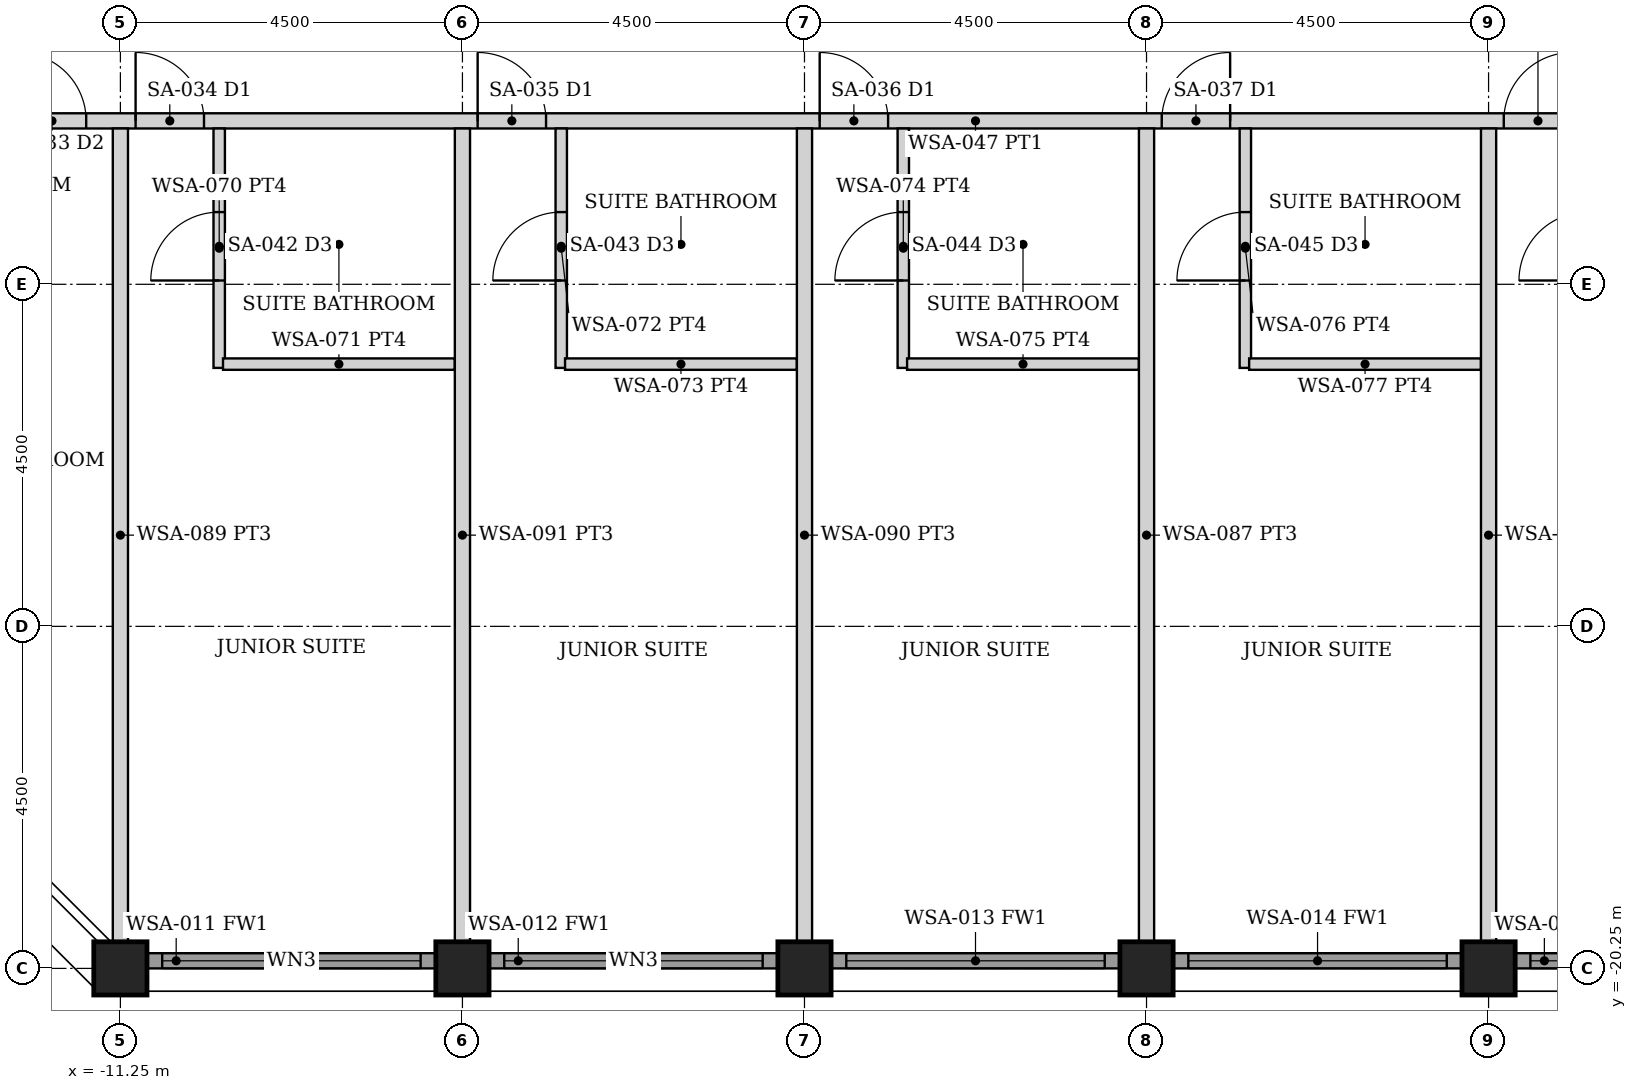
"""IFC4 building model, lengths in metres.
Left out: names, types, materials, properties, quantities, classifications, styles, units other than length and angle.
Written with IfcOpenShell. Run it as: python <this file> out.ifc"""

import sys

from ifc_helpers import new_model, si_unit, direction, frame, frame_2d, origin, origin_2d, place, context, subcontext, project, spatial, rectangle, hollow_rectangle, extrude, element, fill, save


model = new_model("IFC4")
c1 = context("Model", 3, precision=1e-05, world=origin(), true_north=direction((0.0, 1.0)))
c2 = subcontext(c1, "Body", "Model", "MODEL_VIEW")
j1 = project(units=[si_unit("LENGTHUNIT", "METRE"), si_unit("PLANEANGLEUNIT", "RADIAN")], contexts=[c1])
p1 = place(None, origin())
s1 = spatial("IfcSite", under=j1, at=p1, CompositionType="ELEMENT")
p2 = place(p1, origin())
s2 = spatial("IfcBuilding", under=s1, at=p2, CompositionType="ELEMENT")
p3 = place(p2, frame((0.0, 0.0, 200.8)))
s3 = spatial("IfcBuildingStorey", under=s2, at=p3, CompositionType="ELEMENT", Elevation=200.8)
for number, where, z_axis, x_axis in (
    (1, (-11.25, -20.25, 0.0), (0.0, 0.0, 1.0), (0.0, 1.0, 0.0)),
    (2, (-6.75, -20.25, 0.0), (0.0, 0.0, 1.0), (0.0, 1.0, 0.0)),
    (3, (-2.25, -20.25, 0.0), (0.0, 0.0, 1.0), (0.0, 1.0, 0.0)),
    (4, (2.25, -20.25, 0.0), (0.0, 0.0, 1.0), (0.0, 1.0, 0.0)),
    (5, (6.75, -20.25, 0.0), (0.0, 0.0, 1.0), (0.0, 1.0, 0.0)),
):
    element("IfcColumn", number, at=place(p3, frame(where, z_axis=z_axis, x_axis=x_axis)), inside=s3, PredefinedType="COLUMN", context=c2, shape_type="SweptSolid", body=[
        extrude(hollow_rectangle(XDim=0.7, YDim=0.7, WallThickness=0.045, at=origin_2d()), origin(), (0.0, 0.0, 1.0), 3.75),
    ])
p4 = place(p3, frame((-10.895, -20.15, 0.0), z_axis=(0.0, 0.0, 1.0), x_axis=(1.0, 0.0, 0.0)))
e6 = element("IfcWall", 6, at=p4, inside=s3, PredefinedType="SOLIDWALL", context=c2, shape_type="SweptSolid", body=[
    extrude(rectangle(XDim=3.79, YDim=0.2, at=frame_2d((1.895, 0.0))), origin(), (0.0, 0.0, 1.0), 2.629),
])
p5 = place(p4, frame((0.195, 0.0, 0.3)))
e7 = element("IfcOpeningElement", 7, at=p5, cuts=e6, PredefinedType="OPENING", context=c2, shape_type="SweptSolid", body=[
    extrude(rectangle(XDim=3.4, YDim=2.179, at=frame_2d((1.7, 1.089))), frame((0.0, 0.11, 0.0), z_axis=(0.0, -1.0, 0.0), x_axis=(1.0, 0.0, 0.0)), (0.0, 0.0, 1.0), 0.22),
])
p6 = place(p3, frame((-6.395, -20.15, 0.0), z_axis=(0.0, 0.0, 1.0), x_axis=(1.0, 0.0, 0.0)))
e8 = element("IfcWall", 8, at=p6, inside=s3, PredefinedType="SOLIDWALL", context=c2, shape_type="SweptSolid", body=[
    extrude(rectangle(XDim=3.79, YDim=0.2, at=frame_2d((1.895, 0.0))), origin(), (0.0, 0.0, 1.0), 2.629),
])
p7 = place(p6, frame((0.195, 0.0, 0.3)))
e9 = element("IfcOpeningElement", 9, at=p7, cuts=e8, PredefinedType="OPENING", context=c2, shape_type="SweptSolid", body=[
    extrude(rectangle(XDim=3.4, YDim=2.179, at=frame_2d((1.7, 1.089))), frame((0.0, 0.11, 0.0), z_axis=(0.0, -1.0, 0.0), x_axis=(1.0, 0.0, 0.0)), (0.0, 0.0, 1.0), 0.22),
])
p8 = place(p3, frame((-1.895, -20.15, 0.0), z_axis=(0.0, 0.0, 1.0), x_axis=(1.0, 0.0, 0.0)))
e10 = element("IfcWall", 10, at=p8, inside=s3, PredefinedType="SOLIDWALL", context=c2, shape_type="SweptSolid", body=[
    extrude(rectangle(XDim=3.79, YDim=0.2, at=frame_2d((1.895, 0.0))), origin(), (0.0, 0.0, 1.0), 2.629),
])
p9 = place(p8, frame((0.195, 0.0, 0.3)))
e11 = element("IfcOpeningElement", 11, at=p9, cuts=e10, PredefinedType="OPENING", context=c2, shape_type="SweptSolid", body=[
    extrude(rectangle(XDim=3.4, YDim=2.179, at=frame_2d((1.7, 1.089))), frame((0.0, 0.11, 0.0), z_axis=(0.0, -1.0, 0.0), x_axis=(1.0, 0.0, 0.0)), (0.0, 0.0, 1.0), 0.22),
])
p10 = place(p3, frame((2.605, -20.15, 0.0), z_axis=(0.0, 0.0, 1.0), x_axis=(1.0, 0.0, 0.0)))
e12 = element("IfcWall", 12, at=p10, inside=s3, PredefinedType="SOLIDWALL", context=c2, shape_type="SweptSolid", body=[
    extrude(rectangle(XDim=3.79, YDim=0.2, at=frame_2d((1.895, 0.0))), origin(), (0.0, 0.0, 1.0), 2.629),
])
p11 = place(p10, frame((0.195, 0.0, 0.3)))
e13 = element("IfcOpeningElement", 13, at=p11, cuts=e12, PredefinedType="OPENING", context=c2, shape_type="SweptSolid", body=[
    extrude(rectangle(XDim=3.4, YDim=2.179, at=frame_2d((1.7, 1.089))), frame((0.0, 0.11, 0.0), z_axis=(0.0, -1.0, 0.0), x_axis=(1.0, 0.0, 0.0)), (0.0, 0.0, 1.0), 0.22),
])
p12 = place(p3, frame((7.105, -20.15, 0.0), z_axis=(0.0, 0.0, 1.0), x_axis=(1.0, 0.0, 0.0)))
e14 = element("IfcWall", 14, at=p12, inside=s3, PredefinedType="SOLIDWALL", context=c2, shape_type="SweptSolid", body=[
    extrude(rectangle(XDim=3.79, YDim=0.2, at=frame_2d((1.895, 0.0))), origin(), (0.0, 0.0, 1.0), 2.629),
])
p13 = place(p12, frame((0.195, 0.0, 0.3)))
e15 = element("IfcOpeningElement", 15, at=p13, cuts=e14, PredefinedType="OPENING", context=c2, shape_type="SweptSolid", body=[
    extrude(rectangle(XDim=3.4, YDim=2.179, at=frame_2d((1.7, 1.089))), frame((0.0, 0.11, 0.0), z_axis=(0.0, -1.0, 0.0), x_axis=(1.0, 0.0, 0.0)), (0.0, 0.0, 1.0), 0.22),
])
p14 = place(p3, frame((-20.05, -9.1, 0.0), z_axis=(0.0, 0.0, 1.0), x_axis=(1.0, 0.0, 0.0)))
e16 = element("IfcWall", 16, at=p14, inside=s3, PredefinedType="PARTITIONING", context=c2, shape_type="SweptSolid", body=[
    extrude(rectangle(XDim=40.1, YDim=0.2, at=frame_2d((20.05, 0.0))), origin(), (0.0, 0.0, 1.0), 2.629),
])
p15 = place(p14, frame((9.0, 0.0, 0.0)))
e17 = element("IfcOpeningElement", 17, at=p15, cuts=e16, PredefinedType="OPENING", context=c2, shape_type="SweptSolid", body=[
    extrude(rectangle(XDim=0.9, YDim=2.1, at=frame_2d((0.45, 1.05))), frame((0.0, 0.11, 0.0), z_axis=(0.0, -1.0, 0.0), x_axis=(1.0, 0.0, 0.0)), (0.0, 0.0, 1.0), 0.22),
])
p16 = place(p14, frame((13.5, 0.0, 0.0)))
e18 = element("IfcOpeningElement", 18, at=p16, cuts=e16, PredefinedType="OPENING", context=c2, shape_type="SweptSolid", body=[
    extrude(rectangle(XDim=0.9, YDim=2.1, at=frame_2d((0.45, 1.05))), frame((0.0, 0.11, 0.0), z_axis=(0.0, -1.0, 0.0), x_axis=(1.0, 0.0, 0.0)), (0.0, 0.0, 1.0), 0.22),
])
p17 = place(p14, frame((18.0, 0.0, 0.0)))
e19 = element("IfcOpeningElement", 19, at=p17, cuts=e16, PredefinedType="OPENING", context=c2, shape_type="SweptSolid", body=[
    extrude(rectangle(XDim=0.9, YDim=2.1, at=frame_2d((0.45, 1.05))), frame((0.0, 0.11, 0.0), z_axis=(0.0, -1.0, 0.0), x_axis=(1.0, 0.0, 0.0)), (0.0, 0.0, 1.0), 0.22),
])
p18 = place(p14, frame((22.5, 0.0, 0.0)))
e20 = element("IfcOpeningElement", 20, at=p18, cuts=e16, PredefinedType="OPENING", context=c2, shape_type="SweptSolid", body=[
    extrude(rectangle(XDim=0.9, YDim=2.1, at=frame_2d((0.45, 1.05))), frame((0.0, 0.11, 0.0), z_axis=(0.0, -1.0, 0.0), x_axis=(1.0, 0.0, 0.0)), (0.0, 0.0, 1.0), 0.22),
])
p19 = place(p14, frame((27.0, 0.0, 0.0)))
e21 = element("IfcOpeningElement", 21, at=p19, cuts=e16, PredefinedType="OPENING", context=c2, shape_type="SweptSolid", body=[
    extrude(rectangle(XDim=0.9, YDim=2.1, at=frame_2d((0.45, 1.05))), frame((0.0, 0.11, 0.0), z_axis=(0.0, -1.0, 0.0), x_axis=(1.0, 0.0, 0.0)), (0.0, 0.0, 1.0), 0.22),
])
p20 = place(p14, frame((31.75, 0.0, 0.0)))
e22 = element("IfcOpeningElement", 22, at=p20, cuts=e16, PredefinedType="OPENING", context=c2, shape_type="SweptSolid", body=[
    extrude(rectangle(XDim=0.9, YDim=2.1, at=frame_2d((0.45, 1.05))), frame((0.0, 0.11, 0.0), z_axis=(0.0, -1.0, 0.0), x_axis=(1.0, 0.0, 0.0)), (0.0, 0.0, 1.0), 0.22),
])
p21 = place(p14, frame((7.45, 0.0, 0.0)))
e23 = element("IfcOpeningElement", 23, at=p21, cuts=e16, PredefinedType="OPENING", context=c2, shape_type="SweptSolid", body=[
    extrude(rectangle(XDim=0.9, YDim=2.1, at=frame_2d((0.45, 1.05))), frame((0.0, 0.11, 0.0), z_axis=(0.0, -1.0, 0.0), x_axis=(1.0, 0.0, 0.0)), (0.0, 0.0, 1.0), 0.22),
])
p22 = place(p3, frame((-9.95, -12.35, 0.0), z_axis=(0.0, 0.0, 1.0), x_axis=(0.0, 1.0, 0.0)))
e24 = element("IfcWall", 24, at=p22, inside=s3, PredefinedType="PARTITIONING", context=c2, shape_type="SweptSolid", body=[
    extrude(rectangle(XDim=3.15, YDim=0.15, at=frame_2d((1.575, 0.0))), origin(), (0.0, 0.0, 1.0), 2.629),
])
p23 = place(p22, frame((1.15, 0.0, 0.0)))
e25 = element("IfcOpeningElement", 25, at=p23, cuts=e24, PredefinedType="OPENING", context=c2, shape_type="SweptSolid", body=[
    extrude(rectangle(XDim=0.9, YDim=2.1, at=frame_2d((0.45, 1.05))), frame((0.0, 0.085, 0.0), z_axis=(0.0, -1.0, 0.0), x_axis=(1.0, 0.0, 0.0)), (0.0, 0.0, 1.0), 0.17),
])
p24 = place(p3, frame((-9.9, -12.3, 0.0), z_axis=(0.0, 0.0, 1.0), x_axis=(1.0, 0.0, 0.0)))
e26 = element("IfcWall", 26, at=p24, inside=s3, PredefinedType="PARTITIONING", context=c2, shape_type="SweptSolid", body=[
    extrude(rectangle(XDim=3.05, YDim=0.15, at=frame_2d((1.525, 0.0))), origin(), (0.0, 0.0, 1.0), 2.629),
])
p25 = place(p3, frame((-5.45, -12.35, 0.0), z_axis=(0.0, 0.0, 1.0), x_axis=(0.0, 1.0, 0.0)))
e27 = element("IfcWall", 27, at=p25, inside=s3, PredefinedType="PARTITIONING", context=c2, shape_type="SweptSolid", body=[
    extrude(rectangle(XDim=3.15, YDim=0.15, at=frame_2d((1.575, 0.0))), origin(), (0.0, 0.0, 1.0), 2.629),
])
p26 = place(p25, frame((1.15, 0.0, 0.0)))
e28 = element("IfcOpeningElement", 28, at=p26, cuts=e27, PredefinedType="OPENING", context=c2, shape_type="SweptSolid", body=[
    extrude(rectangle(XDim=0.9, YDim=2.1, at=frame_2d((0.45, 1.05))), frame((0.0, 0.085, 0.0), z_axis=(0.0, -1.0, 0.0), x_axis=(1.0, 0.0, 0.0)), (0.0, 0.0, 1.0), 0.17),
])
p27 = place(p3, frame((-5.4, -12.3, 0.0), z_axis=(0.0, 0.0, 1.0), x_axis=(1.0, 0.0, 0.0)))
e29 = element("IfcWall", 29, at=p27, inside=s3, PredefinedType="PARTITIONING", context=c2, shape_type="SweptSolid", body=[
    extrude(rectangle(XDim=3.05, YDim=0.15, at=frame_2d((1.525, 0.0))), origin(), (0.0, 0.0, 1.0), 2.629),
])
p28 = place(p3, frame((-0.95, -12.35, 0.0), z_axis=(0.0, 0.0, 1.0), x_axis=(0.0, 1.0, 0.0)))
e30 = element("IfcWall", 30, at=p28, inside=s3, PredefinedType="PARTITIONING", context=c2, shape_type="SweptSolid", body=[
    extrude(rectangle(XDim=3.15, YDim=0.15, at=frame_2d((1.575, 0.0))), origin(), (0.0, 0.0, 1.0), 2.629),
])
p29 = place(p28, frame((1.15, 0.0, 0.0)))
e31 = element("IfcOpeningElement", 31, at=p29, cuts=e30, PredefinedType="OPENING", context=c2, shape_type="SweptSolid", body=[
    extrude(rectangle(XDim=0.9, YDim=2.1, at=frame_2d((0.45, 1.05))), frame((0.0, 0.085, 0.0), z_axis=(0.0, -1.0, 0.0), x_axis=(1.0, 0.0, 0.0)), (0.0, 0.0, 1.0), 0.17),
])
p30 = place(p3, frame((-0.9, -12.3, 0.0), z_axis=(0.0, 0.0, 1.0), x_axis=(1.0, 0.0, 0.0)))
e32 = element("IfcWall", 32, at=p30, inside=s3, PredefinedType="PARTITIONING", context=c2, shape_type="SweptSolid", body=[
    extrude(rectangle(XDim=3.05, YDim=0.15, at=frame_2d((1.525, 0.0))), origin(), (0.0, 0.0, 1.0), 2.629),
])
p31 = place(p3, frame((3.55, -12.35, 0.0), z_axis=(0.0, 0.0, 1.0), x_axis=(0.0, 1.0, 0.0)))
e33 = element("IfcWall", 33, at=p31, inside=s3, PredefinedType="PARTITIONING", context=c2, shape_type="SweptSolid", body=[
    extrude(rectangle(XDim=3.15, YDim=0.15, at=frame_2d((1.575, 0.0))), origin(), (0.0, 0.0, 1.0), 2.629),
])
p32 = place(p31, frame((1.15, 0.0, 0.0)))
e34 = element("IfcOpeningElement", 34, at=p32, cuts=e33, PredefinedType="OPENING", context=c2, shape_type="SweptSolid", body=[
    extrude(rectangle(XDim=0.9, YDim=2.1, at=frame_2d((0.45, 1.05))), frame((0.0, 0.085, 0.0), z_axis=(0.0, -1.0, 0.0), x_axis=(1.0, 0.0, 0.0)), (0.0, 0.0, 1.0), 0.17),
])
p33 = place(p3, frame((3.6, -12.3, 0.0), z_axis=(0.0, 0.0, 1.0), x_axis=(1.0, 0.0, 0.0)))
e35 = element("IfcWall", 35, at=p33, inside=s3, PredefinedType="PARTITIONING", context=c2, shape_type="SweptSolid", body=[
    extrude(rectangle(XDim=3.05, YDim=0.15, at=frame_2d((1.525, 0.0))), origin(), (0.0, 0.0, 1.0), 2.629),
])
for number, where, z_axis, x_axis in (
    (36, (-11.25, -19.9, 0.0), (0.0, 0.0, 1.0), (0.0, 1.0, 0.0)),
    (37, (-6.75, -19.9, 0.0), (0.0, 0.0, 1.0), (0.0, 1.0, 0.0)),
    (38, (-2.25, -19.9, 0.0), (0.0, 0.0, 1.0), (0.0, 1.0, 0.0)),
    (39, (2.25, -19.9, 0.0), (0.0, 0.0, 1.0), (0.0, 1.0, 0.0)),
    (40, (6.75, -19.9, 0.0), (0.0, 0.0, 1.0), (0.0, 1.0, 0.0)),
):
    element("IfcWall", number, at=place(p3, frame(where, z_axis=z_axis, x_axis=x_axis)), inside=s3, PredefinedType="PARTITIONING", context=c2, shape_type="SweptSolid", body=[
        extrude(rectangle(XDim=10.7, YDim=0.2, at=frame_2d((5.35, 0.0))), origin(), (0.0, 0.0, 1.0), 2.629),
    ])
p34 = place(p5, origin())
e41 = element("IfcWindow", 41, at=p34, inside=s3, PartitioningType="SINGLE_PANEL", PredefinedType="WINDOW", context=c2, shape_type="SweptSolid", body=[
    extrude(rectangle(XDim=3.4, YDim=2.179, at=frame_2d((1.7, 1.089))), frame((0.0, 0.03, 0.0), z_axis=(0.0, -1.0, 0.0), x_axis=(1.0, 0.0, 0.0)), (0.0, 0.0, 1.0), 0.06),
])
fill(e7, e41)
p35 = place(p7, origin())
e42 = element("IfcWindow", 42, at=p35, inside=s3, PartitioningType="SINGLE_PANEL", PredefinedType="WINDOW", context=c2, shape_type="SweptSolid", body=[
    extrude(rectangle(XDim=3.4, YDim=2.179, at=frame_2d((1.7, 1.089))), frame((0.0, 0.03, 0.0), z_axis=(0.0, -1.0, 0.0), x_axis=(1.0, 0.0, 0.0)), (0.0, 0.0, 1.0), 0.06),
])
fill(e9, e42)
p36 = place(p9, origin())
e43 = element("IfcWindow", 43, at=p36, inside=s3, PartitioningType="SINGLE_PANEL", PredefinedType="WINDOW", context=c2, shape_type="SweptSolid", body=[
    extrude(rectangle(XDim=3.4, YDim=2.179, at=frame_2d((1.7, 1.089))), frame((0.0, 0.03, 0.0), z_axis=(0.0, -1.0, 0.0), x_axis=(1.0, 0.0, 0.0)), (0.0, 0.0, 1.0), 0.06),
])
fill(e11, e43)
p37 = place(p11, origin())
e44 = element("IfcWindow", 44, at=p37, inside=s3, PartitioningType="SINGLE_PANEL", PredefinedType="WINDOW", context=c2, shape_type="SweptSolid", body=[
    extrude(rectangle(XDim=3.4, YDim=2.179, at=frame_2d((1.7, 1.089))), frame((0.0, 0.03, 0.0), z_axis=(0.0, -1.0, 0.0), x_axis=(1.0, 0.0, 0.0)), (0.0, 0.0, 1.0), 0.06),
])
fill(e13, e44)
p38 = place(p13, origin())
e45 = element("IfcWindow", 45, at=p38, inside=s3, PartitioningType="SINGLE_PANEL", PredefinedType="WINDOW", context=c2, shape_type="SweptSolid", body=[
    extrude(rectangle(XDim=3.4, YDim=2.179, at=frame_2d((1.7, 1.089))), frame((0.0, 0.03, 0.0), z_axis=(0.0, -1.0, 0.0), x_axis=(1.0, 0.0, 0.0)), (0.0, 0.0, 1.0), 0.06),
])
fill(e15, e45)
p39 = place(p15, origin())
e46 = element("IfcDoor", 46, at=p39, inside=s3, OperationType="SINGLE_SWING_LEFT", PredefinedType="DOOR", context=c2, shape_type="SweptSolid", body=[
    extrude(rectangle(XDim=0.9, YDim=2.1, at=frame_2d((0.45, 1.05))), frame((0.0, 0.025, 0.0), z_axis=(0.0, -1.0, 0.0), x_axis=(1.0, 0.0, 0.0)), (0.0, 0.0, 1.0), 0.05),
])
fill(e17, e46)
p40 = place(p23, origin())
e47 = element("IfcDoor", 47, at=p40, inside=s3, OperationType="SINGLE_SWING_LEFT", PredefinedType="DOOR", context=c2, shape_type="SweptSolid", body=[
    extrude(rectangle(XDim=0.9, YDim=2.1, at=frame_2d((0.45, 1.05))), frame((0.0, 0.025, 0.0), z_axis=(0.0, -1.0, 0.0), x_axis=(1.0, 0.0, 0.0)), (0.0, 0.0, 1.0), 0.05),
])
fill(e25, e47)
p41 = place(p16, origin())
e48 = element("IfcDoor", 48, at=p41, inside=s3, OperationType="SINGLE_SWING_LEFT", PredefinedType="DOOR", context=c2, shape_type="SweptSolid", body=[
    extrude(rectangle(XDim=0.9, YDim=2.1, at=frame_2d((0.45, 1.05))), frame((0.0, 0.025, 0.0), z_axis=(0.0, -1.0, 0.0), x_axis=(1.0, 0.0, 0.0)), (0.0, 0.0, 1.0), 0.05),
])
fill(e18, e48)
p42 = place(p26, origin())
e49 = element("IfcDoor", 49, at=p42, inside=s3, OperationType="SINGLE_SWING_LEFT", PredefinedType="DOOR", context=c2, shape_type="SweptSolid", body=[
    extrude(rectangle(XDim=0.9, YDim=2.1, at=frame_2d((0.45, 1.05))), frame((0.0, 0.025, 0.0), z_axis=(0.0, -1.0, 0.0), x_axis=(1.0, 0.0, 0.0)), (0.0, 0.0, 1.0), 0.05),
])
fill(e28, e49)
p43 = place(p17, origin())
e50 = element("IfcDoor", 50, at=p43, inside=s3, OperationType="SINGLE_SWING_LEFT", PredefinedType="DOOR", context=c2, shape_type="SweptSolid", body=[
    extrude(rectangle(XDim=0.9, YDim=2.1, at=frame_2d((0.45, 1.05))), frame((0.0, 0.025, 0.0), z_axis=(0.0, -1.0, 0.0), x_axis=(1.0, 0.0, 0.0)), (0.0, 0.0, 1.0), 0.05),
])
fill(e19, e50)
p44 = place(p29, origin())
e51 = element("IfcDoor", 51, at=p44, inside=s3, OperationType="SINGLE_SWING_LEFT", PredefinedType="DOOR", context=c2, shape_type="SweptSolid", body=[
    extrude(rectangle(XDim=0.9, YDim=2.1, at=frame_2d((0.45, 1.05))), frame((0.0, 0.025, 0.0), z_axis=(0.0, -1.0, 0.0), x_axis=(1.0, 0.0, 0.0)), (0.0, 0.0, 1.0), 0.05),
])
fill(e31, e51)
p45 = place(p18, origin())
e52 = element("IfcDoor", 52, at=p45, inside=s3, OperationType="SINGLE_SWING_RIGHT", PredefinedType="DOOR", context=c2, shape_type="SweptSolid", body=[
    extrude(rectangle(XDim=0.9, YDim=2.1, at=frame_2d((0.45, 1.05))), frame((0.0, 0.025, 0.0), z_axis=(0.0, -1.0, 0.0), x_axis=(1.0, 0.0, 0.0)), (0.0, 0.0, 1.0), 0.05),
])
fill(e20, e52)
p46 = place(p32, origin())
e53 = element("IfcDoor", 53, at=p46, inside=s3, OperationType="SINGLE_SWING_LEFT", PredefinedType="DOOR", context=c2, shape_type="SweptSolid", body=[
    extrude(rectangle(XDim=0.9, YDim=2.1, at=frame_2d((0.45, 1.05))), frame((0.0, 0.025, 0.0), z_axis=(0.0, -1.0, 0.0), x_axis=(1.0, 0.0, 0.0)), (0.0, 0.0, 1.0), 0.05),
])
fill(e34, e53)
p47 = place(p19, origin())
e54 = element("IfcDoor", 54, at=p47, inside=s3, OperationType="SINGLE_SWING_RIGHT", PredefinedType="DOOR", context=c2, shape_type="SweptSolid", body=[
    extrude(rectangle(XDim=0.9, YDim=2.1, at=frame_2d((0.45, 1.05))), frame((0.0, 0.025, 0.0), z_axis=(0.0, -1.0, 0.0), x_axis=(1.0, 0.0, 0.0)), (0.0, 0.0, 1.0), 0.05),
])
fill(e21, e54)
p48 = place(p21, origin())
e55 = element("IfcDoor", 55, at=p48, inside=s3, OperationType="SINGLE_SWING_LEFT", PredefinedType="DOOR", context=c2, shape_type="SweptSolid", body=[
    extrude(rectangle(XDim=0.9, YDim=2.1, at=frame_2d((0.45, 1.05))), frame((0.0, 0.025, 0.0), z_axis=(0.0, -1.0, 0.0), x_axis=(1.0, 0.0, 0.0)), (0.0, 0.0, 1.0), 0.05),
])
fill(e23, e55)
save(model, sys.argv[1])
